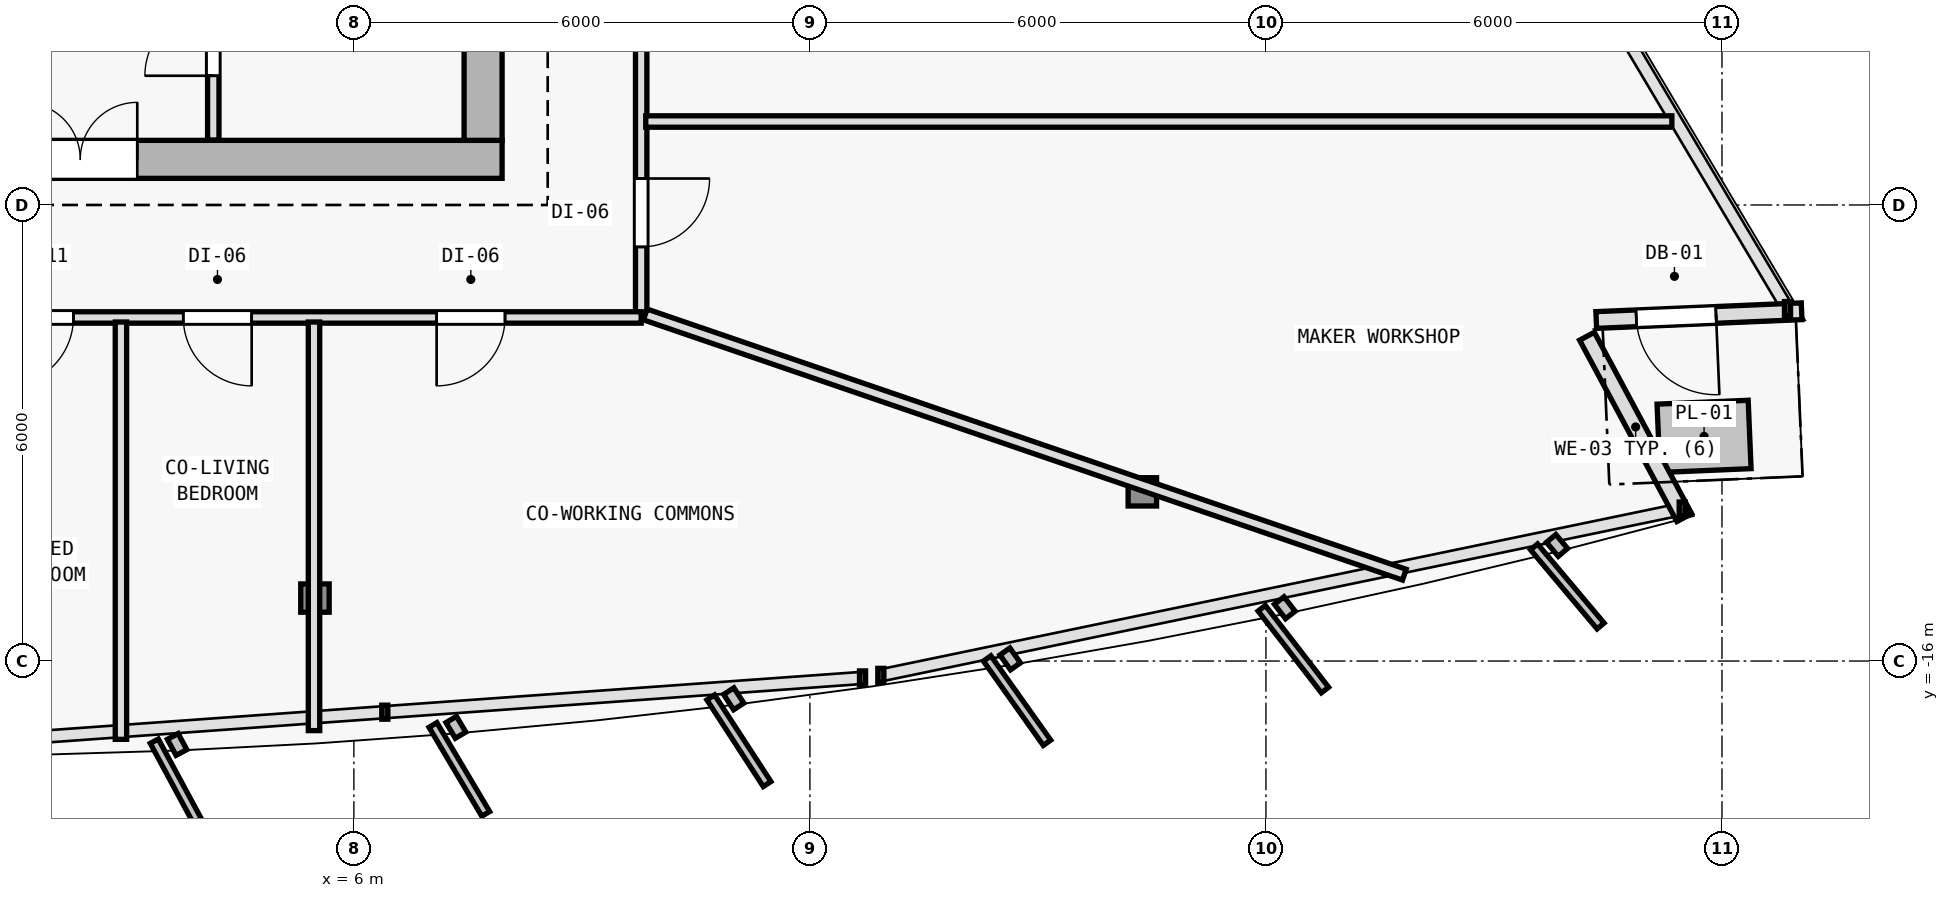
"""IFC4 building model, lengths in metres.
Left out: names, types, materials, properties, quantities, classifications, styles, units other than length and angle.
Written with IfcOpenShell. Run it as: python <this file> out.ifc"""

import sys

from ifc_helpers import new_model, si_unit, direction, frame, frame_2d, origin, origin_2d, place, context, subcontext, project, spatial, rectangle, i_section, extrude, element, fill, save


model = new_model("IFC4")
c1 = context("Model", 3, precision=1e-05, world=origin(), true_north=direction((0.0, 1.0)))
c2 = subcontext(c1, "Body", "Model", "MODEL_VIEW")
j1 = project(units=[si_unit("LENGTHUNIT", "METRE"), si_unit("PLANEANGLEUNIT", "RADIAN")], contexts=[c1])
p1 = place(None, origin())
s1 = spatial("IfcSite", under=j1, at=p1, CompositionType="ELEMENT")
p2 = place(p1, origin())
s2 = spatial("IfcBuilding", under=s1, at=p2, CompositionType="ELEMENT")
p3 = place(p2, frame((0.0, 0.0, 227.1)))
s3 = spatial("IfcBuildingStorey", under=s2, at=p3, CompositionType="ELEMENT", Elevation=227.1)
p4 = place(p3, frame((7.7, -9.4, 0.0), z_axis=(0.0, 0.0, 1.0), x_axis=(1.0, 0.0, 0.0)))
e1 = element("IfcColumn", 1, at=p4, inside=s3, PredefinedType="COLUMN", context=c2, shape_type="SweptSolid", body=[
    extrude(i_section(OverallWidth=0.398, OverallDepth=0.387, WebThickness=0.013, FlangeThickness=0.022, FilletRadius=0.015, at=origin_2d()), origin(), (0.0, 0.0, 1.0), 3.6),
])
p5 = place(p3, frame((5.488, -15.172, 0.005), z_axis=(-0.00693381708, 0.03528089279, 0.999353381334), x_axis=(-0.981229659911, -0.192842823335, 0.0)))
e2 = element("IfcColumn", 2, at=p5, inside=s3, PredefinedType="COLUMN", context=c2, shape_type="SweptSolid", body=[
    extrude(i_section(OverallWidth=0.374, OverallDepth=0.372, WebThickness=0.012, FlangeThickness=0.02, FilletRadius=0.015, at=origin_2d()), origin(), (0.0, 0.0, 1.0), 3.592),
])
p6 = place(p3, frame((16.374, -13.774, 0.005), z_axis=(-0.020594893987, 0.033509183946, 0.999226193078), x_axis=(-0.851954850327, -0.523615252838, 0.0)))
e3 = element("IfcColumn", 3, at=p6, inside=s3, PredefinedType="COLUMN", context=c2, shape_type="SweptSolid", body=[
    extrude(i_section(OverallWidth=0.374, OverallDepth=0.372, WebThickness=0.012, FlangeThickness=0.02, FilletRadius=0.015, at=origin_2d()), origin(), (0.0, 0.0, 1.0), 3.592),
])
p7 = place(p3, frame((22.224, -11.727, 0.0), z_axis=(0.0, 0.0, 1.0), x_axis=(0.47278184311, -0.881179509989, 0.0)))
e4 = element("IfcWall", 4, at=p7, inside=s3, PredefinedType="SOLIDWALL", context=c2, shape_type="SweptSolid", body=[
    extrude(rectangle(XDim=2.708, YDim=0.22, at=frame_2d((1.354, 0.0))), origin(), (0.0, 0.0, 1.0), 3.35),
])
p8 = place(p3, frame((25.048, -11.398, 0.0), z_axis=(0.0, 0.0, 1.0), x_axis=(-0.999095922254, -0.042512799655, 0.0)))
e5 = element("IfcWall", 5, at=p8, inside=s3, PredefinedType="SOLIDWALL", context=c2, shape_type="SweptSolid", body=[
    extrude(rectangle(XDim=2.705, YDim=0.22, at=frame_2d((1.353, 0.0))), origin(), (0.0, 0.0, 1.0), 3.35),
])
p9 = place(p8, frame((1.127, 0.0, 0.0)))
e6 = element("IfcOpeningElement", 6, at=p9, cuts=e5, PredefinedType="OPENING", context=c2, shape_type="SweptSolid", body=[
    extrude(rectangle(XDim=1.05, YDim=2.15, at=frame_2d((0.525, 1.075))), frame((0.0, 0.12, 0.0), z_axis=(0.0, -1.0, 0.0), x_axis=(1.0, 0.0, 0.0)), (0.0, 0.0, 1.0), 0.24),
])
p10 = place(p3, frame((-7.95, -9.4, 0.0), z_axis=(0.0, 0.0, 1.0), x_axis=(1.0, 0.0, 0.0)))
e7 = element("IfcWall", 7, at=p10, inside=s3, PredefinedType="SHEAR", context=c2, shape_type="SweptSolid", body=[
    extrude(rectangle(XDim=15.9, YDim=0.5, at=frame_2d((7.95, 0.0))), origin(), (0.0, 0.0, 1.0), 3.35),
])
p11 = place(p10, frame((9.6, 0.0, 0.0)))
e8 = element("IfcOpeningElement", 8, at=p11, cuts=e7, PredefinedType="OPENING", context=c2, shape_type="SweptSolid", body=[
    extrude(rectangle(XDim=1.5, YDim=2.2, at=frame_2d((0.75, 1.1))), frame((0.0, 0.26, 0.0), z_axis=(0.0, -1.0, 0.0), x_axis=(1.0, 0.0, 0.0)), (0.0, 0.0, 1.0), 0.52),
])
p12 = place(p3, frame((7.7, 9.95, 0.0), z_axis=(0.0, 0.0, 1.0), x_axis=(0.0, -1.0, 0.0)))
e9 = element("IfcWall", 9, at=p12, inside=s3, PredefinedType="SHEAR", context=c2, shape_type="SweptSolid", body=[
    extrude(rectangle(XDim=19.1, YDim=0.5, at=frame_2d((9.55, 0.0))), origin(), (0.0, 0.0, 1.0), 3.35),
])
p13 = place(p3, frame((4.15, -9.145, 0.0), z_axis=(0.0, 0.0, 1.0), x_axis=(0.0, 1.0, 0.0)))
e10 = element("IfcWall", 10, at=p13, inside=s3, PredefinedType="PARTITIONING", context=c2, shape_type="SweptSolid", body=[
    extrude(rectangle(XDim=3.095, YDim=0.15, at=frame_2d((1.547, 0.0))), origin(), (0.0, 0.0, 1.0), 3.35),
])
p14 = place(p13, frame((0.845, 0.0, 0.0)))
e11 = element("IfcOpeningElement", 11, at=p14, cuts=e10, PredefinedType="OPENING", context=c2, shape_type="SweptSolid", body=[
    extrude(rectangle(XDim=0.9, YDim=2.1, at=frame_2d((0.45, 1.05))), frame((0.0, 0.085, 0.0), z_axis=(0.0, -1.0, 0.0), x_axis=(1.0, 0.0, 0.0)), (0.0, 0.0, 1.0), 0.17),
])
p15 = place(p3, frame((9.78, 8.226, 0.0), z_axis=(0.0, 0.0, 1.0), x_axis=(0.0, -1.0, 0.0)))
e12 = element("IfcWall", 12, at=p15, inside=s3, PredefinedType="PARTITIONING", context=c2, shape_type="SweptSolid", body=[
    extrude(rectangle(XDim=19.706, YDim=0.15, at=frame_2d((9.853, 0.0))), origin(), (0.0, 0.0, 1.0), 2.825),
])
p16 = place(p15, frame((17.878, 0.0, 0.0)))
e13 = element("IfcOpeningElement", 13, at=p16, cuts=e12, PredefinedType="OPENING", context=c2, shape_type="SweptSolid", body=[
    extrude(rectangle(XDim=0.9, YDim=2.1, at=frame_2d((0.45, 1.05))), frame((0.0, 0.085, 0.0), z_axis=(0.0, -1.0, 0.0), x_axis=(1.0, 0.0, 0.0)), (0.0, 0.0, 1.0), 0.17),
])
p17 = place(p15, frame((15.028, 0.0, 0.0)))
e14 = element("IfcOpeningElement", 14, at=p17, cuts=e12, PredefinedType="OPENING", context=c2, shape_type="SweptSolid", body=[
    extrude(rectangle(XDim=0.9, YDim=2.1, at=frame_2d((0.45, 1.05))), frame((0.0, 0.085, 0.0), z_axis=(0.0, -1.0, 0.0), x_axis=(1.0, 0.0, 0.0)), (0.0, 0.0, 1.0), 0.17),
])
p18 = place(p15, frame((12.213, 0.0, 0.0)))
e15 = element("IfcOpeningElement", 15, at=p18, cuts=e12, PredefinedType="OPENING", context=c2, shape_type="SweptSolid", body=[
    extrude(rectangle(XDim=0.9, YDim=2.1, at=frame_2d((0.45, 1.05))), frame((0.0, 0.085, 0.0), z_axis=(0.0, -1.0, 0.0), x_axis=(1.0, 0.0, 0.0)), (0.0, 0.0, 1.0), 0.17),
])
p19 = place(p15, frame((9.971, 0.0, 0.0)))
e16 = element("IfcOpeningElement", 16, at=p19, cuts=e12, PredefinedType="OPENING", context=c2, shape_type="SweptSolid", body=[
    extrude(rectangle(XDim=0.9, YDim=2.1, at=frame_2d((0.45, 1.05))), frame((0.0, 0.085, 0.0), z_axis=(0.0, -1.0, 0.0), x_axis=(1.0, 0.0, 0.0)), (0.0, 0.0, 1.0), 0.17),
])
p20 = place(p15, frame((7.772, 0.0, 0.0)))
e17 = element("IfcOpeningElement", 17, at=p20, cuts=e12, PredefinedType="OPENING", context=c2, shape_type="SweptSolid", body=[
    extrude(rectangle(XDim=0.9, YDim=2.1, at=frame_2d((0.45, 1.05))), frame((0.0, 0.085, 0.0), z_axis=(0.0, -1.0, 0.0), x_axis=(1.0, 0.0, 0.0)), (0.0, 0.0, 1.0), 0.17),
])
p21 = place(p15, frame((5.176, 0.0, 0.0)))
e18 = element("IfcOpeningElement", 18, at=p21, cuts=e12, PredefinedType="OPENING", context=c2, shape_type="SweptSolid", body=[
    extrude(rectangle(XDim=0.9, YDim=2.1, at=frame_2d((0.45, 1.05))), frame((0.0, 0.085, 0.0), z_axis=(0.0, -1.0, 0.0), x_axis=(1.0, 0.0, 0.0)), (0.0, 0.0, 1.0), 0.17),
])
p22 = place(p15, frame((2.603, 0.0, 0.0)))
e19 = element("IfcOpeningElement", 19, at=p22, cuts=e12, PredefinedType="OPENING", context=c2, shape_type="SweptSolid", body=[
    extrude(rectangle(XDim=0.9, YDim=2.1, at=frame_2d((0.45, 1.05))), frame((0.0, 0.085, 0.0), z_axis=(0.0, -1.0, 0.0), x_axis=(1.0, 0.0, 0.0)), (0.0, 0.0, 1.0), 0.17),
])
p23 = place(p3, frame((9.78, -11.48, 0.0), z_axis=(0.0, 0.0, 1.0), x_axis=(-1.0, 0.0, 0.0)))
e20 = element("IfcWall", 20, at=p23, inside=s3, PredefinedType="PARTITIONING", context=c2, shape_type="SweptSolid", body=[
    extrude(rectangle(XDim=19.56, YDim=0.15, at=frame_2d((9.78, 0.0))), origin(), (0.0, 0.0, 1.0), 3.005),
])
p24 = place(p23, frame((13.759, 0.0, 0.0)))
e21 = element("IfcOpeningElement", 21, at=p24, cuts=e20, PredefinedType="OPENING", context=c2, shape_type="SweptSolid", body=[
    extrude(rectangle(XDim=0.9, YDim=2.1, at=frame_2d((0.45, 1.05))), frame((0.0, 0.085, 0.0), z_axis=(0.0, -1.0, 0.0), x_axis=(1.0, 0.0, 0.0)), (0.0, 0.0, 1.0), 0.17),
])
p25 = place(p23, frame((11.802, 0.0, 0.0)))
e22 = element("IfcOpeningElement", 22, at=p25, cuts=e20, PredefinedType="OPENING", context=c2, shape_type="SweptSolid", body=[
    extrude(rectangle(XDim=0.85, YDim=2.1, at=frame_2d((0.425, 1.05))), frame((0.0, 0.085, 0.0), z_axis=(0.0, -1.0, 0.0), x_axis=(1.0, 0.0, 0.0)), (0.0, 0.0, 1.0), 0.17),
])
p26 = place(p23, frame((9.718, 0.0, 0.0)))
e23 = element("IfcOpeningElement", 23, at=p26, cuts=e20, PredefinedType="OPENING", context=c2, shape_type="SweptSolid", body=[
    extrude(rectangle(XDim=0.9, YDim=2.1, at=frame_2d((0.45, 1.05))), frame((0.0, 0.085, 0.0), z_axis=(0.0, -1.0, 0.0), x_axis=(1.0, 0.0, 0.0)), (0.0, 0.0, 1.0), 0.17),
])
p27 = place(p23, frame((7.47, 0.0, 0.0)))
e24 = element("IfcOpeningElement", 24, at=p27, cuts=e20, PredefinedType="OPENING", context=c2, shape_type="SweptSolid", body=[
    extrude(rectangle(XDim=0.9, YDim=2.1, at=frame_2d((0.45, 1.05))), frame((0.0, 0.085, 0.0), z_axis=(0.0, -1.0, 0.0), x_axis=(1.0, 0.0, 0.0)), (0.0, 0.0, 1.0), 0.17),
])
p28 = place(p23, frame((5.125, 0.0, 0.0)))
e25 = element("IfcOpeningElement", 25, at=p28, cuts=e20, PredefinedType="OPENING", context=c2, shape_type="SweptSolid", body=[
    extrude(rectangle(XDim=0.9, YDim=2.1, at=frame_2d((0.45, 1.05))), frame((0.0, 0.085, 0.0), z_axis=(0.0, -1.0, 0.0), x_axis=(1.0, 0.0, 0.0)), (0.0, 0.0, 1.0), 0.17),
])
p29 = place(p23, frame((1.792, 0.0, 0.0)))
e26 = element("IfcOpeningElement", 26, at=p29, cuts=e20, PredefinedType="OPENING", context=c2, shape_type="SweptSolid", body=[
    extrude(rectangle(XDim=0.9, YDim=2.1, at=frame_2d((0.45, 1.05))), frame((0.0, 0.085, 0.0), z_axis=(0.0, -1.0, 0.0), x_axis=(1.0, 0.0, 0.0)), (0.0, 0.0, 1.0), 0.17),
])
p30 = place(p3, frame((5.475, -11.54, 0.0), z_axis=(0.0, 0.0, 1.0), x_axis=(0.0, -1.0, 0.0)))
e27 = element("IfcWall", 27, at=p30, inside=s3, PredefinedType="PARTITIONING", context=c2, shape_type="SweptSolid", body=[
    extrude(rectangle(XDim=5.375, YDim=0.15, at=frame_2d((2.688, 0.0))), origin(), (0.0, 0.0, 1.0), 2.775),
])
p31 = place(p3, frame((2.935, -11.54, 0.0), z_axis=(0.0, 0.0, 1.0), x_axis=(0.0, -1.0, 0.0)))
e28 = element("IfcWall", 28, at=p31, inside=s3, PredefinedType="PARTITIONING", context=c2, shape_type="SweptSolid", body=[
    extrude(rectangle(XDim=5.49, YDim=0.15, at=frame_2d((2.745, 0.0))), origin(), (0.0, 0.0, 1.0), 2.725),
])
p32 = place(p3, frame((9.84, -8.902, 0.0), z_axis=(0.0, 0.0, 1.0), x_axis=(1.0, 0.0, 0.0)))
e29 = element("IfcWall", 29, at=p32, inside=s3, PredefinedType="PARTITIONING", context=c2, shape_type="SweptSolid", body=[
    extrude(rectangle(XDim=13.501, YDim=0.15, at=frame_2d((6.75, 0.0))), origin(), (0.0, 0.0, 1.0), 2.875),
])
p33 = place(p3, frame((9.834, -11.44, 0.0), z_axis=(0.0, 0.0, 1.0), x_axis=(0.945969051523, -0.324256925232, 0.0)))
e30 = element("IfcWall", 30, at=p33, inside=s3, PredefinedType="PARTITIONING", context=c2, shape_type="SweptSolid", body=[
    extrude(rectangle(XDim=10.557, YDim=0.15, at=frame_2d((5.279, 0.0))), origin(), (0.0, 0.0, 1.0), 2.775),
])
p34 = place(p9, origin())
e31 = element("IfcDoor", 31, at=p34, inside=s3, OperationType="SINGLE_SWING_LEFT", PredefinedType="DOOR", context=c2, shape_type="SweptSolid", body=[
    extrude(rectangle(XDim=1.05, YDim=2.15, at=frame_2d((0.525, 1.075))), frame((0.0, 0.025, 0.0), z_axis=(0.0, -1.0, 0.0), x_axis=(1.0, 0.0, 0.0)), (0.0, 0.0, 1.0), 0.05),
])
fill(e6, e31)
p35 = place(p11, origin())
e32 = element("IfcDoor", 32, at=p35, inside=s3, OperationType="DOUBLE_DOOR_SINGLE_SWING", PredefinedType="DOOR", context=c2, shape_type="SweptSolid", body=[
    extrude(rectangle(XDim=1.5, YDim=2.2, at=frame_2d((0.75, 1.1))), frame((0.0, 0.025, 0.0), z_axis=(0.0, -1.0, 0.0), x_axis=(1.0, 0.0, 0.0)), (0.0, 0.0, 1.0), 0.05),
])
fill(e8, e32)
p36 = place(p14, origin())
e33 = element("IfcDoor", 33, at=p36, inside=s3, OperationType="SINGLE_SWING_LEFT", PredefinedType="DOOR", context=c2, shape_type="SweptSolid", body=[
    extrude(rectangle(XDim=0.9, YDim=2.1, at=frame_2d((0.45, 1.05))), frame((0.0, 0.025, 0.0), z_axis=(0.0, -1.0, 0.0), x_axis=(1.0, 0.0, 0.0)), (0.0, 0.0, 1.0), 0.05),
])
fill(e11, e33)
p37 = place(p27, origin())
e34 = element("IfcDoor", 34, at=p37, inside=s3, OperationType="SINGLE_SWING_RIGHT", PredefinedType="DOOR", context=c2, shape_type="SweptSolid", body=[
    extrude(rectangle(XDim=0.9, YDim=2.1, at=frame_2d((0.45, 1.05))), frame((0.0, 0.025, 0.0), z_axis=(0.0, -1.0, 0.0), x_axis=(1.0, 0.0, 0.0)), (0.0, 0.0, 1.0), 0.05),
])
fill(e24, e34)
p38 = place(p28, origin())
e35 = element("IfcDoor", 35, at=p38, inside=s3, OperationType="SINGLE_SWING_LEFT", PredefinedType="DOOR", context=c2, shape_type="SweptSolid", body=[
    extrude(rectangle(XDim=0.9, YDim=2.1, at=frame_2d((0.45, 1.05))), frame((0.0, 0.025, 0.0), z_axis=(0.0, -1.0, 0.0), x_axis=(1.0, 0.0, 0.0)), (0.0, 0.0, 1.0), 0.05),
])
fill(e25, e35)
p39 = place(p29, origin())
e36 = element("IfcDoor", 36, at=p39, inside=s3, OperationType="SINGLE_SWING_RIGHT", PredefinedType="DOOR", context=c2, shape_type="SweptSolid", body=[
    extrude(rectangle(XDim=0.9, YDim=2.1, at=frame_2d((0.45, 1.05))), frame((0.0, 0.025, 0.0), z_axis=(0.0, -1.0, 0.0), x_axis=(1.0, 0.0, 0.0)), (0.0, 0.0, 1.0), 0.05),
])
fill(e26, e36)
p40 = place(p16, origin())
e37 = element("IfcDoor", 37, at=p40, inside=s3, OperationType="SINGLE_SWING_LEFT", PredefinedType="DOOR", context=c2, shape_type="SweptSolid", body=[
    extrude(rectangle(XDim=0.9, YDim=2.1, at=frame_2d((0.45, 1.05))), frame((0.0, 0.025, 0.0), z_axis=(0.0, -1.0, 0.0), x_axis=(1.0, 0.0, 0.0)), (0.0, 0.0, 1.0), 0.05),
])
fill(e13, e37)
save(model, sys.argv[1])
